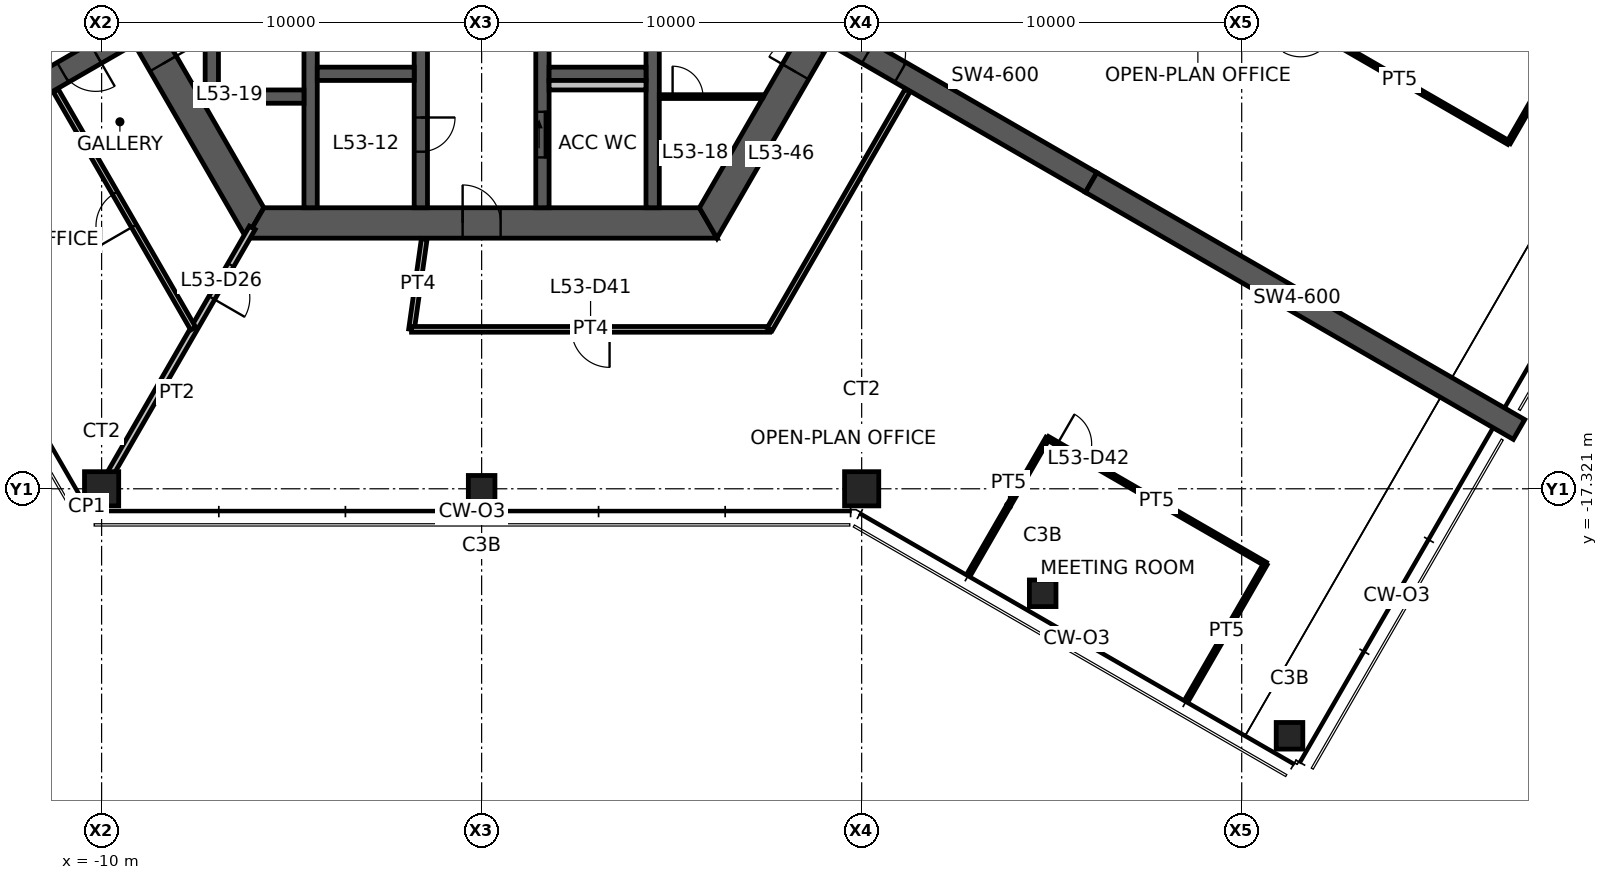
"""IFC4 building model, lengths in metres.
Left out: names, types, materials, properties, quantities, classifications, styles, units other than length and angle.
Written with IfcOpenShell. Run it as: python <this file> out.ifc"""

import sys

from ifc_helpers import new_model, si_unit, direction, frame, frame_2d, origin, origin_2d, place, context, subcontext, project, spatial, polyline, rectangle, hollow_rectangle, outline, extrude, element, fill, save


model = new_model("IFC4")
c1 = context("Model", 3, precision=1e-05, world=origin(), true_north=direction((0.0, 1.0)))
c2 = subcontext(c1, "Body", "Model", "MODEL_VIEW")
j1 = project(units=[si_unit("LENGTHUNIT", "METRE"), si_unit("PLANEANGLEUNIT", "RADIAN")], contexts=[c1])
p1 = place(None, origin())
s1 = spatial("IfcSite", under=j1, at=p1, CompositionType="ELEMENT")
p2 = place(p1, origin())
s2 = spatial("IfcBuilding", under=s1, at=p2, CompositionType="ELEMENT")
p3 = place(p2, frame((0.0, 0.0, 212.8)))
s3 = spatial("IfcBuildingStorey", under=s2, at=p3, CompositionType="ELEMENT", Elevation=212.8)
for number, where, z_axis, x_axis in (
    (1, (-10.0, -17.321, 0.0), (0.0, 0.0, 1.0), (1.0, 0.0, 0.0)),
    (2, (10.0, -17.321, 0.0), (0.0, 0.0, 1.0), (1.0, 0.0, 0.0)),
):
    element("IfcColumn", number, at=place(p3, frame(where, z_axis=z_axis, x_axis=x_axis)), inside=s3, PredefinedType="COLUMN", context=c2, shape_type="SweptSolid", body=[
        extrude(hollow_rectangle(XDim=0.9, YDim=0.9, WallThickness=0.09, at=origin_2d()), origin(), (0.0, 0.0, 1.0), 3.9),
    ])
for number, where, z_axis, x_axis in (
    (3, (0.0, -17.321, 0.0), (0.0, 0.0, 1.0), (1.0, 0.0, 0.0)),
    (4, (14.763, -20.071, 0.0), (0.0, 0.0, 1.0), (1.0, 0.0, 0.0)),
    (5, (21.258, -23.821, 0.0), (0.0, 0.0, 1.0), (1.0, 0.0, 0.0)),
):
    element("IfcColumn", number, at=place(p3, frame(where, z_axis=z_axis, x_axis=x_axis)), inside=s3, PredefinedType="COLUMN", context=c2, shape_type="SweptSolid", body=[
        extrude(hollow_rectangle(XDim=0.7, YDim=0.7, WallThickness=0.036, at=origin_2d()), origin(), (0.0, 0.0, 1.0), 3.9),
    ])
p4 = place(p3, frame((-11.922, 0.0, 0.0), z_axis=(0.0, 0.0, 1.0), x_axis=(0.500004296715, -0.866022923061, 0.0)))
e6 = element("IfcWall", 6, at=p4, inside=s3, PredefinedType="SHEAR", context=c2, shape_type="SweptSolid", body=[
    extrude(outline(polyline([(-0.231, -0.4), (6.281, -0.4), (7.081, -0.4), (12.153, -0.4), (11.691, 0.4), (7.081, 0.4), (6.281, 0.4), (0.231, 0.4), (-0.231, -0.4)])), origin(), (0.0, 0.0, 1.0), 3.9),
])
p5 = place(p4, frame((6.281, 0.0, 0.0)))
e7 = element("IfcOpeningElement", 7, at=p5, cuts=e6, PredefinedType="OPENING", context=c2, shape_type="SweptSolid", body=[
    extrude(rectangle(XDim=0.8, YDim=2.1, at=frame_2d((0.4, 1.05))), frame((0.0, 0.41, 0.0), z_axis=(0.0, -1.0, 0.0), x_axis=(1.0, 0.0, 0.0)), (0.0, 0.0, 1.0), 0.82),
])
p6 = place(p3, frame((-5.961, -10.325, 0.0), z_axis=(0.0, 0.0, 1.0), x_axis=(1.0, 0.0, 0.0)))
e8 = element("IfcWall", 8, at=p6, inside=s3, PredefinedType="SHEAR", context=c2, shape_type="SweptSolid", body=[
    extrude(outline(polyline([(-0.231, -0.4), (5.461, -0.4), (6.461, -0.4), (12.153, -0.4), (11.691, 0.4), (6.461, 0.4), (5.461, 0.4), (0.231, 0.4), (-0.231, -0.4)])), origin(), (0.0, 0.0, 1.0), 3.9),
])
p7 = place(p6, frame((5.461, 0.0, 0.0)))
e9 = element("IfcOpeningElement", 9, at=p7, cuts=e8, PredefinedType="OPENING", context=c2, shape_type="SweptSolid", body=[
    extrude(rectangle(XDim=1.0, YDim=2.1, at=frame_2d((0.5, 1.05))), frame((0.0, 0.41, 0.0), z_axis=(0.0, -1.0, 0.0), x_axis=(1.0, 0.0, 0.0)), (0.0, 0.0, 1.0), 0.82),
])
p8 = place(p3, frame((5.961, -10.325, 0.0), z_axis=(0.0, 0.0, 1.0), x_axis=(0.500004296715, 0.866022923061, 0.0)))
e10 = element("IfcWall", 10, at=p8, inside=s3, PredefinedType="SHEAR", context=c2, shape_type="SweptSolid", body=[
    extrude(outline(polyline([(-0.231, -0.4), (4.594, -0.4), (5.394, -0.4), (12.153, -0.4), (11.691, 0.4), (5.394, 0.4), (4.594, 0.4), (0.231, 0.4), (-0.231, -0.4)])), origin(), (0.0, 0.0, 1.0), 3.9),
])
p9 = place(p8, frame((4.594, 0.0, 0.0)))
e11 = element("IfcOpeningElement", 11, at=p9, cuts=e10, PredefinedType="OPENING", context=c2, shape_type="SweptSolid", body=[
    extrude(rectangle(XDim=0.8, YDim=2.1, at=frame_2d((0.4, 1.05))), frame((0.0, 0.41, 0.0), z_axis=(0.0, -1.0, 0.0), x_axis=(1.0, 0.0, 0.0)), (0.0, 0.0, 1.0), 0.82),
])
p10 = place(p3, frame((-9.288, -5.363, 0.0), z_axis=(0.0, 0.0, 1.0), x_axis=(-0.866027473358, -0.499996415376, 0.0)))
e12 = element("IfcWall", 12, at=p10, inside=s3, PredefinedType="SHEAR", context=c2, shape_type="SweptSolid", body=[
    extrude(rectangle(XDim=7.045, YDim=0.6, at=frame_2d((3.523, 0.0))), origin(), (0.0, 0.0, 1.0), 3.9),
])
p11 = place(p10, frame((1.0, 0.0, 0.0)))
e13 = element("IfcOpeningElement", 13, at=p11, cuts=e12, PredefinedType="OPENING", context=c2, shape_type="SweptSolid", body=[
    extrude(rectangle(XDim=1.0, YDim=2.1, at=frame_2d((0.5, 1.05))), frame((0.0, 0.31, 0.0), z_axis=(0.0, -1.0, 0.0), x_axis=(1.0, 0.0, 0.0)), (0.0, 0.0, 1.0), 0.62),
])
p12 = place(p3, frame((9.288, -5.363, 0.0), z_axis=(0.0, 0.0, 1.0), x_axis=(0.866031736626, -0.499989031036, 0.0)))
e14 = element("IfcWall", 14, at=p12, inside=s3, PredefinedType="SHEAR", context=c2, shape_type="SweptSolid", body=[
    extrude(rectangle(XDim=7.796, YDim=0.6, at=frame_2d((3.898, 0.0))), origin(), (0.0, 0.0, 1.0), 3.9),
])
p13 = place(p12, frame((1.0, 0.0, 0.0)))
e15 = element("IfcOpeningElement", 15, at=p13, cuts=e14, PredefinedType="OPENING", context=c2, shape_type="SweptSolid", body=[
    extrude(rectangle(XDim=1.0, YDim=2.1, at=frame_2d((0.5, 1.05))), frame((0.0, 0.31, 0.0), z_axis=(0.0, -1.0, 0.0), x_axis=(1.0, 0.0, 0.0)), (0.0, 0.0, 1.0), 0.62),
])
p14 = place(p3, frame((16.039, -9.26, 0.0), z_axis=(0.0, 0.0, 1.0), x_axis=(0.866024837091, -0.50000098154, 0.0)))
e16 = element("IfcWall", 16, at=p14, inside=s3, PredefinedType="SHEAR", context=c2, shape_type="SweptSolid", body=[
    extrude(rectangle(XDim=13.0, YDim=0.6, at=frame_2d((6.5, 0.0))), origin(), (0.0, 0.0, 1.0), 3.9),
])
p15 = place(p3, frame((-1.6, -3.775, 0.0), z_axis=(0.0, 0.0, 1.0), x_axis=(0.0, -1.0, 0.0)))
e17 = element("IfcWall", 17, at=p15, inside=s3, PredefinedType="SHEAR", context=c2, shape_type="SweptSolid", body=[
    extrude(rectangle(XDim=6.15, YDim=0.35, at=frame_2d((3.075, 0.0))), origin(), (0.0, 0.0, 1.0), 3.9),
])
p16 = place(p15, frame((3.775, 0.0, 0.0)))
e18 = element("IfcOpeningElement", 18, at=p16, cuts=e17, PredefinedType="OPENING", context=c2, shape_type="SweptSolid", body=[
    extrude(rectangle(XDim=0.9, YDim=2.1, at=frame_2d((0.45, 1.05))), frame((0.0, 0.185, 0.0), z_axis=(0.0, -1.0, 0.0), x_axis=(1.0, 0.0, 0.0)), (0.0, 0.0, 1.0), 0.37),
])
p17 = place(p3, frame((1.6, -3.775, 0.0), z_axis=(0.0, 0.0, 1.0), x_axis=(0.0, -1.0, 0.0)))
e19 = element("IfcWall", 19, at=p17, inside=s3, PredefinedType="SHEAR", context=c2, shape_type="SweptSolid", body=[
    extrude(rectangle(XDim=6.15, YDim=0.35, at=frame_2d((3.075, 0.0))), origin(), (0.0, 0.0, 1.0), 3.9),
])
p18 = place(p17, frame((3.625, 0.0, 0.0)))
e20 = element("IfcOpeningElement", 20, at=p18, cuts=e19, PredefinedType="OPENING", context=c2, shape_type="SweptSolid", body=[
    extrude(rectangle(XDim=1.2, YDim=2.1, at=frame_2d((0.6, 1.05))), frame((0.0, 0.185, 0.0), z_axis=(0.0, -1.0, 0.0), x_axis=(1.0, 0.0, 0.0)), (0.0, 0.0, 1.0), 0.37),
])
for number, where, z_axis, x_axis in (
    (21, (-4.5, -3.775, 0.0), (0.0, 0.0, 1.0), (0.0, -1.0, 0.0)),
    (22, (4.5, -3.775, 0.0), (0.0, 0.0, 1.0), (0.0, -1.0, 0.0)),
):
    element("IfcWall", number, at=place(p3, frame(where, z_axis=z_axis, x_axis=x_axis)), inside=s3, PredefinedType="SHEAR", context=c2, shape_type="SweptSolid", body=[
        extrude(rectangle(XDim=6.15, YDim=0.35, at=frame_2d((3.075, 0.0))), origin(), (0.0, 0.0, 1.0), 3.9),
    ])
for number, where, z_axis, x_axis in (
    (23, (-4.325, -6.4, 0.0), (0.0, 0.0, 1.0), (1.0, 0.0, 0.0)),
    (24, (1.775, -6.4, 0.0), (0.0, 0.0, 1.0), (1.0, 0.0, 0.0)),
):
    element("IfcWall", number, at=place(p3, frame(where, z_axis=z_axis, x_axis=x_axis)), inside=s3, PredefinedType="SHEAR", context=c2, shape_type="SweptSolid", body=[
        extrude(rectangle(XDim=2.55, YDim=0.35, at=frame_2d((1.275, 0.0))), origin(), (0.0, 0.0, 1.0), 3.9),
    ])
p19 = place(p3, frame((-7.275, -7.0, 0.0), z_axis=(0.0, 0.0, 1.0), x_axis=(1.0, 0.0, 0.0)))
e25 = element("IfcWall", 25, at=p19, inside=s3, PredefinedType="SHEAR", context=c2, shape_type="SweptSolid", body=[
    extrude(rectangle(XDim=2.6, YDim=0.35, at=frame_2d((1.3, 0.0))), origin(), (0.0, 0.0, 1.0), 3.9),
])
p20 = place(p3, frame((-7.1, -3.775, 0.0), z_axis=(0.0, 0.0, 1.0), x_axis=(0.0, -1.0, 0.0)))
e26 = element("IfcWall", 26, at=p20, inside=s3, PredefinedType="SHEAR", context=c2, shape_type="SweptSolid", body=[
    extrude(rectangle(XDim=3.05, YDim=0.35, at=frame_2d((1.525, 0.0))), origin(), (0.0, 0.0, 1.0), 3.9),
])
p21 = place(p3, frame((1.775, -6.7, 0.0), z_axis=(0.0, 0.0, 1.0), x_axis=(1.0, 0.0, 0.0)))
e27 = element("IfcWall", 27, at=p21, inside=s3, PredefinedType="PLUMBINGWALL", context=c2, shape_type="SweptSolid", body=[
    extrude(rectangle(XDim=2.55, YDim=0.25, at=frame_2d((1.275, 0.0))), origin(), (0.0, 0.0, 1.0), 3.9),
])
p22 = place(p3, frame((4.675, -7.0, 0.0), z_axis=(0.0, 0.0, 1.0), x_axis=(1.0, 0.0, 0.0)))
e28 = element("IfcWall", 28, at=p22, inside=s3, PredefinedType="PARTITIONING", context=c2, shape_type="SweptSolid", body=[
    extrude(outline(polyline([(0.0, -0.05), (0.35, -0.05), (1.15, -0.05), (2.715, -0.05), (2.744, 0.0), (2.75, 0.05), (1.15, 0.05), (0.35, 0.05), (0.0, 0.05), (0.0, -0.05)])), origin(), (0.0, 0.0, 1.0), 2.95),
])
p23 = place(p22, frame((0.35, 0.0, 0.0)))
e29 = element("IfcOpeningElement", 29, at=p23, cuts=e28, PredefinedType="OPENING", context=c2, shape_type="SweptSolid", body=[
    extrude(rectangle(XDim=0.8, YDim=2.1, at=frame_2d((0.4, 1.05))), frame((0.0, 0.06, 0.0), z_axis=(0.0, -1.0, 0.0), x_axis=(1.0, 0.0, 0.0)), (0.0, 0.0, 1.0), 0.12),
])
p24 = place(p3, frame((-6.035, -10.453, 0.0), z_axis=(0.0, 0.0, 1.0), x_axis=(-0.499989830942, -0.866031274813, 0.0)))
e30 = element("IfcWall", 30, at=p24, inside=s3, PredefinedType="PARTITIONING", context=c2, shape_type="SweptSolid", body=[
    extrude(rectangle(XDim=7.93, YDim=0.175, at=frame_2d((3.965, 0.0))), origin(), (0.0, 0.0, 1.0), 3.05),
])
p25 = place(p24, frame((1.13, 0.0, 0.0)))
e31 = element("IfcOpeningElement", 31, at=p25, cuts=e30, PredefinedType="OPENING", context=c2, shape_type="SweptSolid", body=[
    extrude(rectangle(XDim=1.0, YDim=2.1, at=frame_2d((0.5, 1.05))), frame((0.0, 0.098, 0.0), z_axis=(0.0, -1.0, 0.0), x_axis=(1.0, 0.0, 0.0)), (0.0, 0.0, 1.0), 0.195),
])
p26 = place(p3, frame((-7.589, -13.105, 0.0), z_axis=(0.0, 0.0, 1.0), x_axis=(-0.499986333712, 0.866033293876, 0.0)))
e32 = element("IfcWall", 32, at=p26, inside=s3, PredefinedType="PARTITIONING", context=c2, shape_type="SweptSolid", body=[
    extrude(rectangle(XDim=7.235, YDim=0.15, at=frame_2d((3.617, 0.0))), origin(), (0.0, 0.0, 1.0), 2.95),
])
p27 = place(p26, frame((3.117, 0.0, 0.0)))
e33 = element("IfcOpeningElement", 33, at=p27, cuts=e32, PredefinedType="OPENING", context=c2, shape_type="SweptSolid", body=[
    extrude(rectangle(XDim=1.0, YDim=2.1, at=frame_2d((0.5, 1.05))), frame((0.0, 0.085, 0.0), z_axis=(0.0, -1.0, 0.0), x_axis=(1.0, 0.0, 0.0)), (0.0, 0.0, 1.0), 0.17),
])
p28 = place(p3, frame((27.025, -8.213, 0.0), z_axis=(0.0, 0.0, 1.0), x_axis=(-0.866021597574, 0.500006592492, 0.0)))
e34 = element("IfcWall", 34, at=p28, inside=s3, PredefinedType="PARTITIONING", context=c2, shape_type="SweptSolid", body=[
    extrude(rectangle(XDim=6.62, YDim=0.1, at=frame_2d((3.31, 0.0))), origin(), (0.0, 0.0, 1.0), 2.95),
])
p29 = place(p28, frame((5.42, 0.0, 0.0)))
e35 = element("IfcOpeningElement", 35, at=p29, cuts=e34, PredefinedType="OPENING", context=c2, shape_type="SweptSolid", body=[
    extrude(rectangle(XDim=0.9, YDim=2.1, at=frame_2d((0.45, 1.05))), frame((0.0, 0.06, 0.0), z_axis=(0.0, -1.0, 0.0), x_axis=(1.0, 0.0, 0.0)), (0.0, 0.0, 1.0), 0.12),
])
p30 = place(p3, frame((29.08, -4.653, 0.0), z_axis=(0.0, 0.0, 1.0), x_axis=(-0.500010383074, -0.866019409031, 0.0)))
e36 = element("IfcWall", 36, at=p30, inside=s3, PredefinedType="PARTITIONING", context=c2, shape_type="SweptSolid", body=[
    extrude(rectangle(XDim=4.11, YDim=0.1, at=frame_2d((2.055, 0.0))), origin(), (0.0, 0.0, 1.0), 2.95),
])
p31 = place(p3, frame((-1.844, -13.125, 0.0), z_axis=(0.0, 0.0, 1.0), x_axis=(0.139173892267, 0.99026795753, 0.0)))
e37 = element("IfcWall", 37, at=p31, inside=s3, PredefinedType="PARTITIONING", context=c2, shape_type="SweptSolid", body=[
    extrude(rectangle(XDim=2.403, YDim=0.15, at=frame_2d((1.202, 0.0))), origin(), (0.0, 0.0, 1.0), 2.95),
])
p32 = place(p3, frame((7.578, -13.125, 0.0), z_axis=(0.0, 0.0, 1.0), x_axis=(-1.0, 0.0, 0.0)))
e38 = element("IfcWall", 38, at=p32, inside=s3, PredefinedType="PARTITIONING", context=c2, shape_type="SweptSolid", body=[
    extrude(rectangle(XDim=9.422, YDim=0.15, at=frame_2d((4.711, 0.0))), origin(), (0.0, 0.0, 1.0), 2.95),
])
p33 = place(p32, frame((4.211, 0.0, 0.0)))
e39 = element("IfcOpeningElement", 39, at=p33, cuts=e38, PredefinedType="OPENING", context=c2, shape_type="SweptSolid", body=[
    extrude(rectangle(XDim=1.0, YDim=2.1, at=frame_2d((0.5, 1.05))), frame((0.0, 0.085, 0.0), z_axis=(0.0, -1.0, 0.0), x_axis=(1.0, 0.0, 0.0)), (0.0, 0.0, 1.0), 0.17),
])
p34 = place(p3, frame((11.207, -6.84, 0.0), z_axis=(0.0, 0.0, 1.0), x_axis=(-0.500002959843, -0.866023694911, 0.0)))
e40 = element("IfcWall", 40, at=p34, inside=s3, PredefinedType="PARTITIONING", context=c2, shape_type="SweptSolid", body=[
    extrude(rectangle(XDim=7.258, YDim=0.15, at=frame_2d((3.629, 0.0))), origin(), (0.0, 0.0, 1.0), 2.95),
])
p35 = place(p3, frame((12.837, -19.548, 0.0), z_axis=(0.0, 0.0, 1.0), x_axis=(0.499965833383, 0.866045128991, 0.0)))
e41 = element("IfcWall", 41, at=p35, inside=s3, PredefinedType="PARTITIONING", context=c2, shape_type="SweptSolid", body=[
    extrude(rectangle(XDim=4.11, YDim=0.1, at=frame_2d((2.055, 0.0))), origin(), (0.0, 0.0, 1.0), 2.95),
])
p36 = place(p3, frame((14.892, -15.988, 0.0), z_axis=(0.0, 0.0, 1.0), x_axis=(0.866030817826, -0.499990622488, 0.0)))
e42 = element("IfcWall", 42, at=p36, inside=s3, PredefinedType="PARTITIONING", context=c2, shape_type="SweptSolid", body=[
    extrude(rectangle(XDim=6.62, YDim=0.1, at=frame_2d((3.31, 0.0))), origin(), (0.0, 0.0, 1.0), 2.95),
])
p37 = place(p36, frame((0.3, 0.0, 0.0)))
e43 = element("IfcOpeningElement", 43, at=p37, cuts=e42, PredefinedType="OPENING", context=c2, shape_type="SweptSolid", body=[
    extrude(rectangle(XDim=0.9, YDim=2.1, at=frame_2d((0.45, 1.05))), frame((0.0, 0.06, 0.0), z_axis=(0.0, -1.0, 0.0), x_axis=(1.0, 0.0, 0.0)), (0.0, 0.0, 1.0), 0.12),
])
p38 = place(p3, frame((20.625, -19.298, 0.0), z_axis=(0.0, 0.0, 1.0), x_axis=(-0.500000428765, -0.866025156237, 0.0)))
e44 = element("IfcWall", 44, at=p38, inside=s3, PredefinedType="PARTITIONING", context=c2, shape_type="SweptSolid", body=[
    extrude(rectangle(XDim=4.08, YDim=0.1, at=frame_2d((2.04, 0.0))), origin(), (0.0, 0.0, 1.0), 2.95),
])
p39 = place(p7, origin())
e45 = element("IfcDoor", 45, at=p39, inside=s3, OperationType="SINGLE_SWING_LEFT", PredefinedType="DOOR", context=c2, shape_type="SweptSolid", body=[
    extrude(rectangle(XDim=1.0, YDim=2.1, at=frame_2d((0.5, 1.05))), frame((0.0, 0.025, 0.0), z_axis=(0.0, -1.0, 0.0), x_axis=(1.0, 0.0, 0.0)), (0.0, 0.0, 1.0), 0.05),
])
fill(e9, e45)
p40 = place(p9, origin())
e46 = element("IfcDoor", 46, at=p40, inside=s3, OperationType="SINGLE_SWING_LEFT", PredefinedType="DOOR", context=c2, shape_type="SweptSolid", body=[
    extrude(rectangle(XDim=0.8, YDim=2.1, at=frame_2d((0.4, 1.05))), frame((0.0, 0.025, 0.0), z_axis=(0.0, -1.0, 0.0), x_axis=(1.0, 0.0, 0.0)), (0.0, 0.0, 1.0), 0.05),
])
fill(e11, e46)
p41 = place(p5, origin())
e47 = element("IfcDoor", 47, at=p41, inside=s3, OperationType="SINGLE_SWING_RIGHT", PredefinedType="DOOR", context=c2, shape_type="SweptSolid", body=[
    extrude(rectangle(XDim=0.8, YDim=2.1, at=frame_2d((0.4, 1.05))), frame((0.0, 0.025, 0.0), z_axis=(0.0, -1.0, 0.0), x_axis=(1.0, 0.0, 0.0)), (0.0, 0.0, 1.0), 0.05),
])
fill(e7, e47)
p42 = place(p18, origin())
e48 = element("IfcDoor", 48, at=p42, inside=s3, OperationType="SLIDING_TO_LEFT", PredefinedType="DOOR", context=c2, shape_type="SweptSolid", body=[
    extrude(rectangle(XDim=1.2, YDim=2.1, at=frame_2d((0.6, 1.05))), frame((0.0, 0.025, 0.0), z_axis=(0.0, -1.0, 0.0), x_axis=(1.0, 0.0, 0.0)), (0.0, 0.0, 1.0), 0.05),
])
fill(e20, e48)
p43 = place(p16, origin())
e49 = element("IfcDoor", 49, at=p43, inside=s3, OperationType="SINGLE_SWING_LEFT", PredefinedType="DOOR", context=c2, shape_type="SweptSolid", body=[
    extrude(rectangle(XDim=0.9, YDim=2.1, at=frame_2d((0.45, 1.05))), frame((0.0, 0.025, 0.0), z_axis=(0.0, -1.0, 0.0), x_axis=(1.0, 0.0, 0.0)), (0.0, 0.0, 1.0), 0.05),
])
fill(e18, e49)
p44 = place(p11, origin())
e50 = element("IfcDoor", 50, at=p44, inside=s3, OperationType="SINGLE_SWING_LEFT", PredefinedType="DOOR", context=c2, shape_type="SweptSolid", body=[
    extrude(rectangle(XDim=1.0, YDim=2.1, at=frame_2d((0.5, 1.05))), frame((0.0, 0.025, 0.0), z_axis=(0.0, -1.0, 0.0), x_axis=(1.0, 0.0, 0.0)), (0.0, 0.0, 1.0), 0.05),
])
fill(e13, e50)
p45 = place(p13, origin())
e51 = element("IfcDoor", 51, at=p45, inside=s3, OperationType="SINGLE_SWING_LEFT", PredefinedType="DOOR", context=c2, shape_type="SweptSolid", body=[
    extrude(rectangle(XDim=1.0, YDim=2.1, at=frame_2d((0.5, 1.05))), frame((0.0, 0.025, 0.0), z_axis=(0.0, -1.0, 0.0), x_axis=(1.0, 0.0, 0.0)), (0.0, 0.0, 1.0), 0.05),
])
fill(e15, e51)
p46 = place(p23, origin())
e52 = element("IfcDoor", 52, at=p46, inside=s3, OperationType="SINGLE_SWING_LEFT", PredefinedType="DOOR", context=c2, shape_type="SweptSolid", body=[
    extrude(rectangle(XDim=0.8, YDim=2.1, at=frame_2d((0.4, 1.05))), frame((0.0, 0.025, 0.0), z_axis=(0.0, -1.0, 0.0), x_axis=(1.0, 0.0, 0.0)), (0.0, 0.0, 1.0), 0.05),
])
fill(e29, e52)
p47 = place(p25, origin())
e53 = element("IfcDoor", 53, at=p47, inside=s3, OperationType="SINGLE_SWING_RIGHT", PredefinedType="DOOR", context=c2, shape_type="SweptSolid", body=[
    extrude(rectangle(XDim=1.0, YDim=2.1, at=frame_2d((0.5, 1.05))), frame((0.0, 0.025, 0.0), z_axis=(0.0, -1.0, 0.0), x_axis=(1.0, 0.0, 0.0)), (0.0, 0.0, 1.0), 0.05),
])
fill(e31, e53)
p48 = place(p27, origin())
e54 = element("IfcDoor", 54, at=p48, inside=s3, OperationType="SINGLE_SWING_LEFT", PredefinedType="DOOR", context=c2, shape_type="SweptSolid", body=[
    extrude(rectangle(XDim=1.0, YDim=2.1, at=frame_2d((0.5, 1.05))), frame((0.0, 0.025, 0.0), z_axis=(0.0, -1.0, 0.0), x_axis=(1.0, 0.0, 0.0)), (0.0, 0.0, 1.0), 0.05),
])
fill(e33, e54)
p49 = place(p33, origin())
e55 = element("IfcDoor", 55, at=p49, inside=s3, OperationType="SINGLE_SWING_LEFT", PredefinedType="DOOR", context=c2, shape_type="SweptSolid", body=[
    extrude(rectangle(XDim=1.0, YDim=2.1, at=frame_2d((0.5, 1.05))), frame((0.0, 0.025, 0.0), z_axis=(0.0, -1.0, 0.0), x_axis=(1.0, 0.0, 0.0)), (0.0, 0.0, 1.0), 0.05),
])
fill(e39, e55)
p50 = place(p37, origin())
e56 = element("IfcDoor", 56, at=p50, inside=s3, OperationType="SINGLE_SWING_LEFT", PredefinedType="DOOR", context=c2, shape_type="SweptSolid", body=[
    extrude(rectangle(XDim=0.9, YDim=2.1, at=frame_2d((0.45, 1.05))), frame((0.0, 0.025, 0.0), z_axis=(0.0, -1.0, 0.0), x_axis=(1.0, 0.0, 0.0)), (0.0, 0.0, 1.0), 0.05),
])
fill(e43, e56)
save(model, sys.argv[1])
